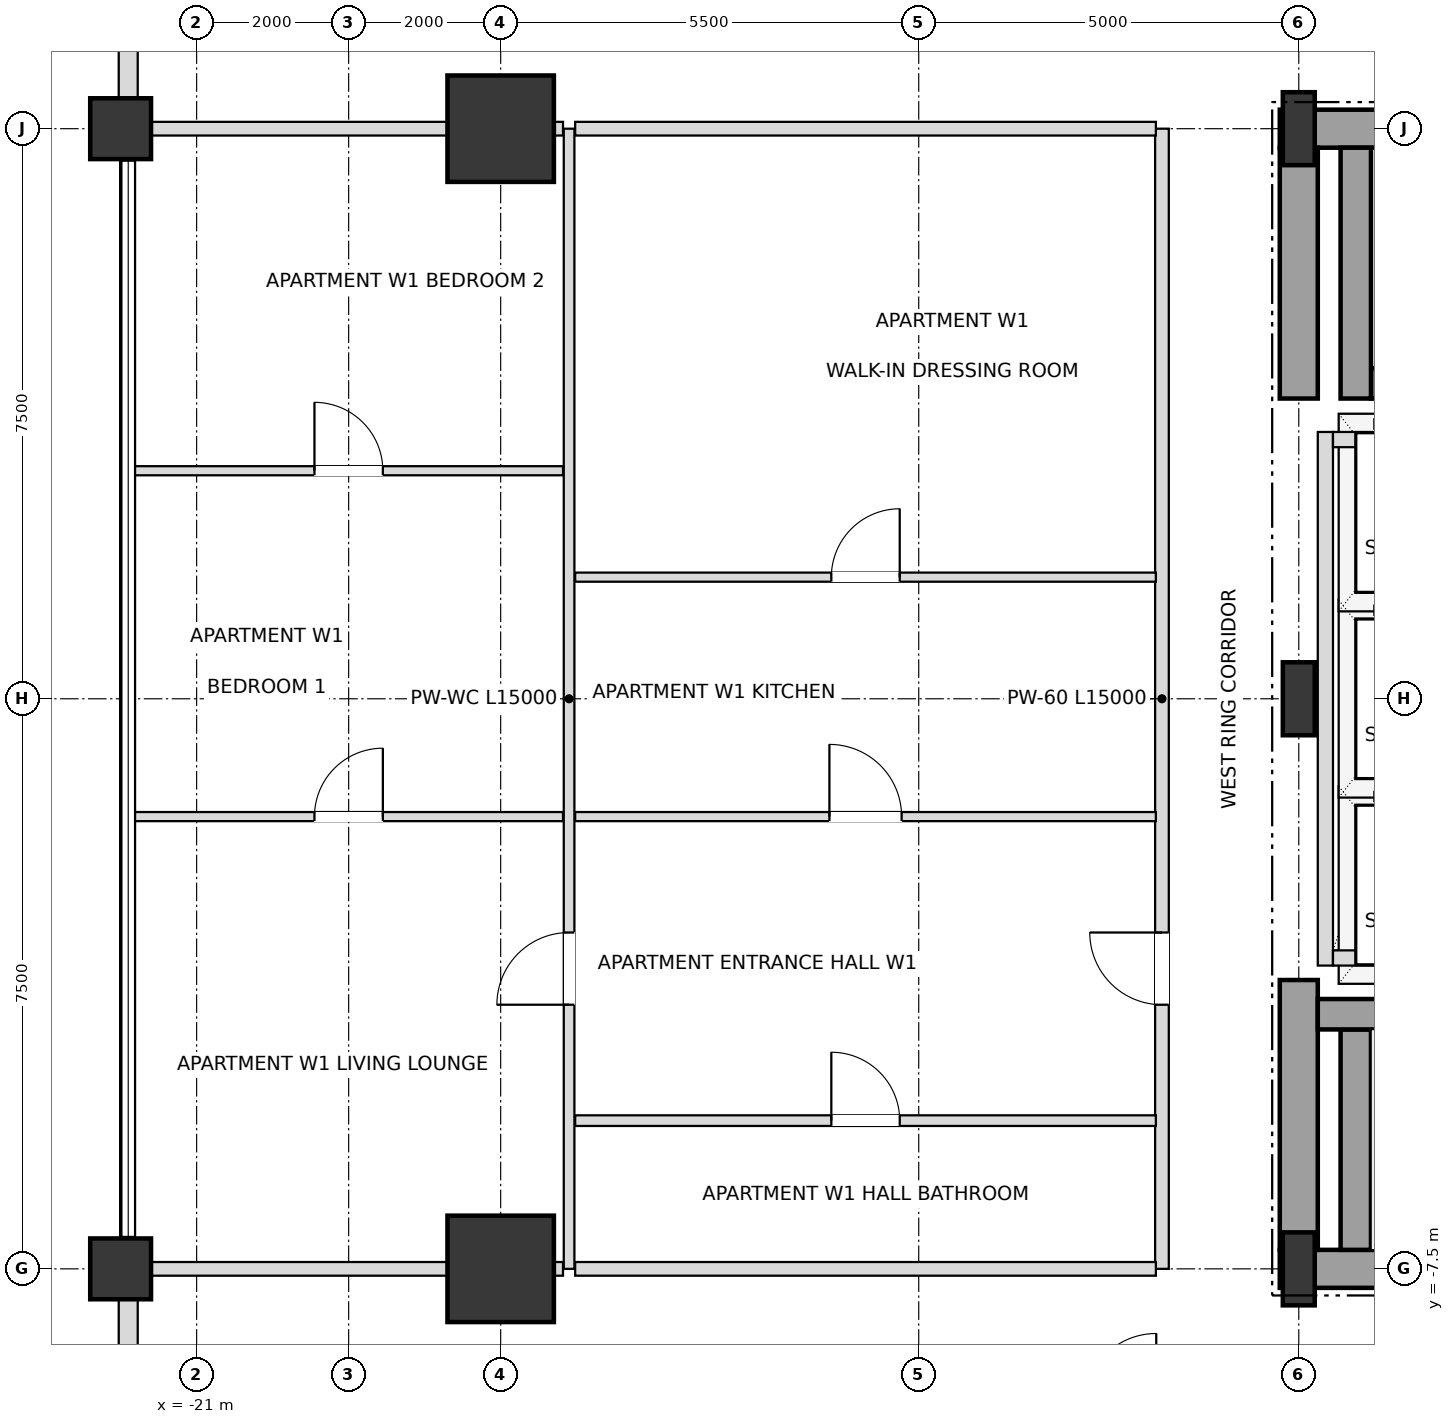
"""IFC4 building model, lengths in metres.
Left out: names, types, materials, properties, quantities, classifications, styles, units other than length and angle.
Written with IfcOpenShell. Run it as: python <this file> out.ifc"""

import sys

from ifc_helpers import new_model, si_unit, direction, frame, frame_2d, origin, origin_2d, place, context, subcontext, project, spatial, rectangle, i_section, extrude, element, fill, save


model = new_model("IFC4")
c1 = context("Model", 3, precision=1e-05, world=origin(), true_north=direction((0.0, 1.0)))
c2 = subcontext(c1, "Body", "Model", "MODEL_VIEW")
j1 = project(units=[si_unit("LENGTHUNIT", "METRE"), si_unit("PLANEANGLEUNIT", "RADIAN")], contexts=[c1])
p1 = place(None, origin())
s1 = spatial("IfcSite", under=j1, at=p1, CompositionType="ELEMENT")
p2 = place(p1, origin())
s2 = spatial("IfcBuilding", under=s1, at=p2, CompositionType="ELEMENT")
p3 = place(p2, frame((0.0, 0.0, 57.6)))
s3 = spatial("IfcBuildingStorey", under=s2, at=p3, CompositionType="ELEMENT", Elevation=57.6)
for number, where, z_axis, x_axis in (
    (1, (-6.5, -7.5, 0.0), (0.0, 0.0, 1.0), (1.0, 0.0, 0.0)),
    (2, (-6.5, 0.0, 0.0), (0.0, 0.0, 1.0), (1.0, 0.0, 0.0)),
    (3, (-6.5, 7.5, 0.0), (0.0, 0.0, 1.0), (1.0, 0.0, 0.0)),
):
    element("IfcColumn", number, at=place(p3, frame(where, z_axis=z_axis, x_axis=x_axis)), inside=s3, PredefinedType="COLUMN", context=c2, shape_type="SweptSolid", body=[
        extrude(i_section(OverallWidth=0.42, OverallDepth=0.96, WebThickness=0.022, FlangeThickness=0.034, at=origin_2d()), origin(), (0.0, 0.0, 1.0), 3.6),
    ])
for number, where, z_axis, x_axis in (
    (4, (-17.0, 7.5, 0.0), (0.0, 0.0, 1.0), (1.0, 0.0, 0.0)),
    (5, (-17.0, -7.5, 0.0), (0.0, 0.0, 1.0), (1.0, 0.0, 0.0)),
):
    element("IfcColumn", number, at=place(p3, frame(where, z_axis=z_axis, x_axis=x_axis)), inside=s3, PredefinedType="USERDEFINED", context=c2, shape_type="SweptSolid", body=[
        extrude(rectangle(XDim=1.4, YDim=1.4, at=origin_2d()), origin(), (0.0, 0.0, 1.0), 3.6),
    ])
for number, where, z_axis, x_axis in (
    (6, (-22.0, -7.5, 0.0), (0.0, 0.0, 1.0), (1.0, 0.0, 0.0)),
    (7, (-22.0, 7.5, 0.0), (0.0, 0.0, 1.0), (1.0, 0.0, 0.0)),
):
    element("IfcColumn", number, at=place(p3, frame(where, z_axis=z_axis, x_axis=x_axis)), inside=s3, PredefinedType="COLUMN", context=c2, shape_type="SweptSolid", body=[
        extrude(rectangle(XDim=0.8, YDim=0.8, at=origin_2d()), origin(), (0.0, 0.0, 1.0), 3.6),
    ])
p4 = place(p3, frame((-21.9, 12.605, 0.0), z_axis=(0.0, 0.0, 1.0), x_axis=(0.0, -1.0, 0.0)))
e8 = element("IfcWall", 8, at=p4, inside=s3, PredefinedType="SOLIDWALL", context=c2, shape_type="SweptSolid", body=[
    extrude(rectangle(XDim=4.71, YDim=0.25, at=frame_2d((2.355, 0.0))), origin(), (0.0, 0.0, 1.0), 2.736),
])
p5 = place(p4, frame((1.455, 0.0, 0.72)))
e9 = element("IfcOpeningElement", 9, at=p5, cuts=e8, PredefinedType="OPENING", context=c2, shape_type="SweptSolid", body=[
    extrude(rectangle(XDim=1.8, YDim=1.68, at=frame_2d((0.9, 0.84))), frame((0.0, 0.135, 0.0), z_axis=(0.0, -1.0, 0.0), x_axis=(1.0, 0.0, 0.0)), (0.0, 0.0, 1.0), 0.27),
])
p6 = place(p3, frame((-21.9, -7.895, 0.0), z_axis=(0.0, 0.0, 1.0), x_axis=(0.0, -1.0, 0.0)))
e10 = element("IfcWall", 10, at=p6, inside=s3, PredefinedType="SOLIDWALL", context=c2, shape_type="SweptSolid", body=[
    extrude(rectangle(XDim=4.71, YDim=0.25, at=frame_2d((2.355, 0.0))), origin(), (0.0, 0.0, 1.0), 2.736),
])
p7 = place(p6, frame((1.455, 0.0, 0.72)))
e11 = element("IfcOpeningElement", 11, at=p7, cuts=e10, PredefinedType="OPENING", context=c2, shape_type="SweptSolid", body=[
    extrude(rectangle(XDim=1.8, YDim=1.68, at=frame_2d((0.9, 0.84))), frame((0.0, 0.135, 0.0), z_axis=(0.0, -1.0, 0.0), x_axis=(1.0, 0.0, 0.0)), (0.0, 0.0, 1.0), 0.27),
])
p8 = place(p3, frame((-6.75, -7.5, 0.0), z_axis=(0.0, 0.0, 1.0), x_axis=(1.0, 0.0, 0.0)))
e12 = element("IfcWall", 12, at=p8, inside=s3, PredefinedType="SHEAR", context=c2, shape_type="SweptSolid", body=[
    extrude(rectangle(XDim=6.75, YDim=0.5, at=frame_2d((3.375, 0.0))), origin(), (0.0, 0.0, 1.0), 3.38),
])
p9 = place(p3, frame((-6.75, 7.5, 0.0), z_axis=(0.0, 0.0, 1.0), x_axis=(1.0, 0.0, 0.0)))
e13 = element("IfcWall", 13, at=p9, inside=s3, PredefinedType="SHEAR", context=c2, shape_type="SweptSolid", body=[
    extrude(rectangle(XDim=6.75, YDim=0.5, at=frame_2d((3.375, 0.0))), origin(), (0.0, 0.0, 1.0), 3.38),
])
p10 = place(p9, frame((1.65, 0.0, 0.0)))
e14 = element("IfcOpeningElement", 14, at=p10, cuts=e13, PredefinedType="OPENING", context=c2, shape_type="SweptSolid", body=[
    extrude(rectangle(XDim=1.05, YDim=2.15, at=frame_2d((0.525, 1.075))), frame((0.0, 0.26, 0.0), z_axis=(0.0, -1.0, 0.0), x_axis=(1.0, 0.0, 0.0)), (0.0, 0.0, 1.0), 0.52),
])
p11 = place(p3, frame((-6.5, -7.25, 0.0), z_axis=(0.0, 0.0, 1.0), x_axis=(0.0, 1.0, 0.0)))
e15 = element("IfcWall", 15, at=p11, inside=s3, PredefinedType="SHEAR", context=c2, shape_type="SweptSolid", body=[
    extrude(rectangle(XDim=3.55, YDim=0.5, at=frame_2d((1.775, 0.0))), origin(), (0.0, 0.0, 1.0), 3.38),
])
p12 = place(p3, frame((-6.5, 3.95, 0.0), z_axis=(0.0, 0.0, 1.0), x_axis=(0.0, 1.0, 0.0)))
e16 = element("IfcWall", 16, at=p12, inside=s3, PredefinedType="SHEAR", context=c2, shape_type="SweptSolid", body=[
    extrude(rectangle(XDim=3.3, YDim=0.5, at=frame_2d((1.65, 0.0))), origin(), (0.0, 0.0, 1.0), 3.38),
])
p13 = place(p3, frame((-5.75, -7.25, 0.0), z_axis=(0.0, 0.0, 1.0), x_axis=(0.0, 1.0, 0.0)))
e17 = element("IfcWall", 17, at=p13, inside=s3, PredefinedType="SHEAR", context=c2, shape_type="SweptSolid", body=[
    extrude(rectangle(XDim=2.9, YDim=0.4, at=frame_2d((1.45, 0.0))), origin(), (0.0, 0.0, 1.0), 3.38),
])
p14 = place(p3, frame((-6.25, -4.15, 0.0), z_axis=(0.0, 0.0, 1.0), x_axis=(1.0, 0.0, 0.0)))
e18 = element("IfcWall", 18, at=p14, inside=s3, PredefinedType="SHEAR", context=c2, shape_type="SweptSolid", body=[
    extrude(rectangle(XDim=7.78, YDim=0.4, at=frame_2d((3.89, 0.0))), origin(), (0.0, 0.0, 1.0), 3.38),
])
p15 = place(p3, frame((-5.55, 4.15, 0.0), z_axis=(0.0, 0.0, 1.0), x_axis=(1.0, 0.0, 0.0)))
e19 = element("IfcWall", 19, at=p15, inside=s3, PredefinedType="SHEAR", context=c2, shape_type="SweptSolid", body=[
    extrude(rectangle(XDim=7.08, YDim=0.4, at=frame_2d((3.54, 0.0))), origin(), (0.0, 0.0, 1.0), 3.38),
])
p16 = place(p3, frame((-5.75, 3.95, 0.0), z_axis=(0.0, 0.0, 1.0), x_axis=(0.0, 1.0, 0.0)))
e20 = element("IfcWall", 20, at=p16, inside=s3, PredefinedType="SHEAR", context=c2, shape_type="SweptSolid", body=[
    extrude(rectangle(XDim=3.3, YDim=0.4, at=frame_2d((1.65, 0.0))), origin(), (0.0, 0.0, 1.0), 3.38),
])
p17 = place(p3, frame((-6.15, -3.51, 0.0), z_axis=(0.0, 0.0, 1.0), x_axis=(0.0, 1.0, 0.0)))
e21 = element("IfcWall", 21, at=p17, inside=s3, PredefinedType="SOLIDWALL", context=c2, shape_type="SweptSolid", body=[
    extrude(rectangle(XDim=7.02, YDim=0.2, at=frame_2d((3.51, 0.0))), origin(), (0.0, 0.0, 1.0), 3.38),
])
for number, where, z_axis, x_axis in (
    (22, (-6.05, -3.41, 0.0), (0.0, 0.0, 1.0), (1.0, 0.0, 0.0)),
    (23, (-6.05, 3.41, 0.0), (0.0, 0.0, 1.0), (1.0, 0.0, 0.0)),
):
    element("IfcWall", number, at=place(p3, frame(where, z_axis=z_axis, x_axis=x_axis)), inside=s3, PredefinedType="SOLIDWALL", context=c2, shape_type="SweptSolid", body=[
        extrude(rectangle(XDim=2.2, YDim=0.2, at=frame_2d((1.1, 0.0))), origin(), (0.0, 0.0, 1.0), 3.38),
    ])
p18 = place(p3, frame((-16.1, -7.5, 0.0), z_axis=(0.0, 0.0, 1.0), x_axis=(0.0, 1.0, 0.0)))
e24 = element("IfcWall", 24, at=p18, inside=s3, PredefinedType="PARTITIONING", context=c2, shape_type="SweptSolid", body=[
    extrude(rectangle(XDim=15.0, YDim=0.14, at=frame_2d((7.5, 0.0))), origin(), (0.0, 0.0, 1.0), 3.38),
])
p19 = place(p18, frame((3.475, 0.0, 0.0)))
e25 = element("IfcOpeningElement", 25, at=p19, cuts=e24, PredefinedType="OPENING", context=c2, shape_type="SweptSolid", body=[
    extrude(rectangle(XDim=0.95, YDim=2.1, at=frame_2d((0.475, 1.05))), frame((0.0, 0.08, 0.0), z_axis=(0.0, -1.0, 0.0), x_axis=(1.0, 0.0, 0.0)), (0.0, 0.0, 1.0), 0.16),
])
p20 = place(p3, frame((-8.3, -7.5, 0.0), z_axis=(0.0, 0.0, 1.0), x_axis=(0.0, 1.0, 0.0)))
e26 = element("IfcWall", 26, at=p20, inside=s3, PredefinedType="PARTITIONING", context=c2, shape_type="SweptSolid", body=[
    extrude(rectangle(XDim=15.0, YDim=0.18, at=frame_2d((7.5, 0.0))), origin(), (0.0, 0.0, 1.0), 3.38),
])
p21 = place(p20, frame((3.475, 0.0, 0.0)))
e27 = element("IfcOpeningElement", 27, at=p21, cuts=e26, PredefinedType="OPENING", context=c2, shape_type="SweptSolid", body=[
    extrude(rectangle(XDim=0.95, YDim=2.15, at=frame_2d((0.475, 1.075))), frame((0.0, 0.1, 0.0), z_axis=(0.0, -1.0, 0.0), x_axis=(1.0, 0.0, 0.0)), (0.0, 0.0, 1.0), 0.2),
])
p22 = place(p3, frame((-21.9, -7.5, 0.0), z_axis=(0.0, 0.0, 1.0), x_axis=(1.0, 0.0, 0.0)))
e28 = element("IfcWall", 28, at=p22, inside=s3, PredefinedType="PARTITIONING", context=c2, shape_type="SweptSolid", body=[
    extrude(rectangle(XDim=5.72, YDim=0.18, at=frame_2d((2.86, 0.0))), origin(), (0.0, 0.0, 1.0), 2.816),
])
p23 = place(p3, frame((-16.02, -7.5, 0.0), z_axis=(0.0, 0.0, 1.0), x_axis=(1.0, 0.0, 0.0)))
e29 = element("IfcWall", 29, at=p23, inside=s3, PredefinedType="PARTITIONING", context=c2, shape_type="SweptSolid", body=[
    extrude(rectangle(XDim=7.64, YDim=0.18, at=frame_2d((3.82, 0.0))), origin(), (0.0, 0.0, 1.0), 2.816),
])
p24 = place(p3, frame((-16.02, -5.55, 0.0), z_axis=(0.0, 0.0, 1.0), x_axis=(1.0, 0.0, 0.0)))
e30 = element("IfcWall", 30, at=p24, inside=s3, PredefinedType="PARTITIONING", context=c2, shape_type="SweptSolid", body=[
    extrude(rectangle(XDim=7.64, YDim=0.14, at=frame_2d((3.82, 0.0))), origin(), (0.0, 0.0, 1.0), 2.948),
])
p25 = place(p24, frame((3.37, 0.0, 0.0)))
e31 = element("IfcOpeningElement", 31, at=p25, cuts=e30, PredefinedType="OPENING", context=c2, shape_type="SweptSolid", body=[
    extrude(rectangle(XDim=0.9, YDim=2.1, at=frame_2d((0.45, 1.05))), frame((0.0, 0.08, 0.0), z_axis=(0.0, -1.0, 0.0), x_axis=(1.0, 0.0, 0.0)), (0.0, 0.0, 1.0), 0.16),
])
p26 = place(p3, frame((-21.82, -1.55, 0.0), z_axis=(0.0, 0.0, 1.0), x_axis=(1.0, 0.0, 0.0)))
e32 = element("IfcWall", 32, at=p26, inside=s3, PredefinedType="PARTITIONING", context=c2, shape_type="SweptSolid", body=[
    extrude(rectangle(XDim=5.64, YDim=0.12, at=frame_2d((2.82, 0.0))), origin(), (0.0, 0.0, 1.0), 2.816),
])
p27 = place(p26, frame((2.37, 0.0, 0.0)))
e33 = element("IfcOpeningElement", 33, at=p27, cuts=e32, PredefinedType="OPENING", context=c2, shape_type="SweptSolid", body=[
    extrude(rectangle(XDim=0.9, YDim=2.1, at=frame_2d((0.45, 1.05))), frame((0.0, 0.07, 0.0), z_axis=(0.0, -1.0, 0.0), x_axis=(1.0, 0.0, 0.0)), (0.0, 0.0, 1.0), 0.14),
])
p28 = place(p3, frame((-16.02, -1.55, 0.0), z_axis=(0.0, 0.0, 1.0), x_axis=(1.0, 0.0, 0.0)))
e34 = element("IfcWall", 34, at=p28, inside=s3, PredefinedType="PARTITIONING", context=c2, shape_type="SweptSolid", body=[
    extrude(rectangle(XDim=7.64, YDim=0.12, at=frame_2d((3.82, 0.0))), origin(), (0.0, 0.0, 1.0), 2.948),
])
p29 = place(p28, frame((3.345, 0.0, 0.0)))
e35 = element("IfcOpeningElement", 35, at=p29, cuts=e34, PredefinedType="OPENING", context=c2, shape_type="SweptSolid", body=[
    extrude(rectangle(XDim=0.95, YDim=2.1, at=frame_2d((0.475, 1.05))), frame((0.0, 0.07, 0.0), z_axis=(0.0, -1.0, 0.0), x_axis=(1.0, 0.0, 0.0)), (0.0, 0.0, 1.0), 0.14),
])
p30 = place(p3, frame((-16.02, 1.6, 0.0), z_axis=(0.0, 0.0, 1.0), x_axis=(1.0, 0.0, 0.0)))
e36 = element("IfcWall", 36, at=p30, inside=s3, PredefinedType="PARTITIONING", context=c2, shape_type="SweptSolid", body=[
    extrude(rectangle(XDim=7.64, YDim=0.12, at=frame_2d((3.82, 0.0))), origin(), (0.0, 0.0, 1.0), 2.948),
])
p31 = place(p30, frame((3.37, 0.0, 0.0)))
e37 = element("IfcOpeningElement", 37, at=p31, cuts=e36, PredefinedType="OPENING", context=c2, shape_type="SweptSolid", body=[
    extrude(rectangle(XDim=0.9, YDim=2.1, at=frame_2d((0.45, 1.05))), frame((0.0, 0.07, 0.0), z_axis=(0.0, -1.0, 0.0), x_axis=(1.0, 0.0, 0.0)), (0.0, 0.0, 1.0), 0.14),
])
p32 = place(p3, frame((-21.82, 3.0, 0.0), z_axis=(0.0, 0.0, 1.0), x_axis=(1.0, 0.0, 0.0)))
e38 = element("IfcWall", 38, at=p32, inside=s3, PredefinedType="PARTITIONING", context=c2, shape_type="SweptSolid", body=[
    extrude(rectangle(XDim=5.64, YDim=0.12, at=frame_2d((2.82, 0.0))), origin(), (0.0, 0.0, 1.0), 2.816),
])
p33 = place(p32, frame((2.37, 0.0, 0.0)))
e39 = element("IfcOpeningElement", 39, at=p33, cuts=e38, PredefinedType="OPENING", context=c2, shape_type="SweptSolid", body=[
    extrude(rectangle(XDim=0.9, YDim=2.1, at=frame_2d((0.45, 1.05))), frame((0.0, 0.07, 0.0), z_axis=(0.0, -1.0, 0.0), x_axis=(1.0, 0.0, 0.0)), (0.0, 0.0, 1.0), 0.14),
])
p34 = place(p3, frame((-21.9, 7.5, 0.0), z_axis=(0.0, 0.0, 1.0), x_axis=(1.0, 0.0, 0.0)))
e40 = element("IfcWall", 40, at=p34, inside=s3, PredefinedType="PARTITIONING", context=c2, shape_type="SweptSolid", body=[
    extrude(rectangle(XDim=5.72, YDim=0.18, at=frame_2d((2.86, 0.0))), origin(), (0.0, 0.0, 1.0), 2.816),
])
p35 = place(p3, frame((-16.02, 7.5, 0.0), z_axis=(0.0, 0.0, 1.0), x_axis=(1.0, 0.0, 0.0)))
e41 = element("IfcWall", 41, at=p35, inside=s3, PredefinedType="PARTITIONING", context=c2, shape_type="SweptSolid", body=[
    extrude(rectangle(XDim=7.64, YDim=0.18, at=frame_2d((3.82, 0.0))), origin(), (0.0, 0.0, 1.0), 2.816),
])
p36 = place(p25, origin())
e42 = element("IfcDoor", 42, at=p36, inside=s3, OperationType="SINGLE_SWING_LEFT", PredefinedType="DOOR", context=c2, shape_type="SweptSolid", body=[
    extrude(rectangle(XDim=0.9, YDim=2.1, at=frame_2d((0.45, 1.05))), frame((0.0, 0.025, 0.0), z_axis=(0.0, -1.0, 0.0), x_axis=(1.0, 0.0, 0.0)), (0.0, 0.0, 1.0), 0.05),
])
fill(e31, e42)
p37 = place(p21, origin())
e43 = element("IfcDoor", 43, at=p37, inside=s3, OperationType="SINGLE_SWING_RIGHT", PredefinedType="DOOR", context=c2, shape_type="SweptSolid", body=[
    extrude(rectangle(XDim=0.95, YDim=2.15, at=frame_2d((0.475, 1.075))), frame((0.0, 0.025, 0.0), z_axis=(0.0, -1.0, 0.0), x_axis=(1.0, 0.0, 0.0)), (0.0, 0.0, 1.0), 0.05),
])
fill(e27, e43)
p38 = place(p29, origin())
e44 = element("IfcDoor", 44, at=p38, inside=s3, OperationType="SINGLE_SWING_LEFT", PredefinedType="DOOR", context=c2, shape_type="SweptSolid", body=[
    extrude(rectangle(XDim=0.95, YDim=2.1, at=frame_2d((0.475, 1.05))), frame((0.0, 0.025, 0.0), z_axis=(0.0, -1.0, 0.0), x_axis=(1.0, 0.0, 0.0)), (0.0, 0.0, 1.0), 0.05),
])
fill(e35, e44)
p39 = place(p31, origin())
e45 = element("IfcDoor", 45, at=p39, inside=s3, OperationType="SINGLE_SWING_RIGHT", PredefinedType="DOOR", context=c2, shape_type="SweptSolid", body=[
    extrude(rectangle(XDim=0.9, YDim=2.1, at=frame_2d((0.45, 1.05))), frame((0.0, 0.025, 0.0), z_axis=(0.0, -1.0, 0.0), x_axis=(1.0, 0.0, 0.0)), (0.0, 0.0, 1.0), 0.05),
])
fill(e37, e45)
p40 = place(p19, origin())
e46 = element("IfcDoor", 46, at=p40, inside=s3, OperationType="SINGLE_SWING_LEFT", PredefinedType="DOOR", context=c2, shape_type="SweptSolid", body=[
    extrude(rectangle(XDim=0.95, YDim=2.1, at=frame_2d((0.475, 1.05))), frame((0.0, 0.025, 0.0), z_axis=(0.0, -1.0, 0.0), x_axis=(1.0, 0.0, 0.0)), (0.0, 0.0, 1.0), 0.05),
])
fill(e25, e46)
p41 = place(p27, origin())
e47 = element("IfcDoor", 47, at=p41, inside=s3, OperationType="SINGLE_SWING_RIGHT", PredefinedType="DOOR", context=c2, shape_type="SweptSolid", body=[
    extrude(rectangle(XDim=0.9, YDim=2.1, at=frame_2d((0.45, 1.05))), frame((0.0, 0.025, 0.0), z_axis=(0.0, -1.0, 0.0), x_axis=(1.0, 0.0, 0.0)), (0.0, 0.0, 1.0), 0.05),
])
fill(e33, e47)
p42 = place(p33, origin())
e48 = element("IfcDoor", 48, at=p42, inside=s3, OperationType="SINGLE_SWING_LEFT", PredefinedType="DOOR", context=c2, shape_type="SweptSolid", body=[
    extrude(rectangle(XDim=0.9, YDim=2.1, at=frame_2d((0.45, 1.05))), frame((0.0, 0.025, 0.0), z_axis=(0.0, -1.0, 0.0), x_axis=(1.0, 0.0, 0.0)), (0.0, 0.0, 1.0), 0.05),
])
fill(e39, e48)
save(model, sys.argv[1])
